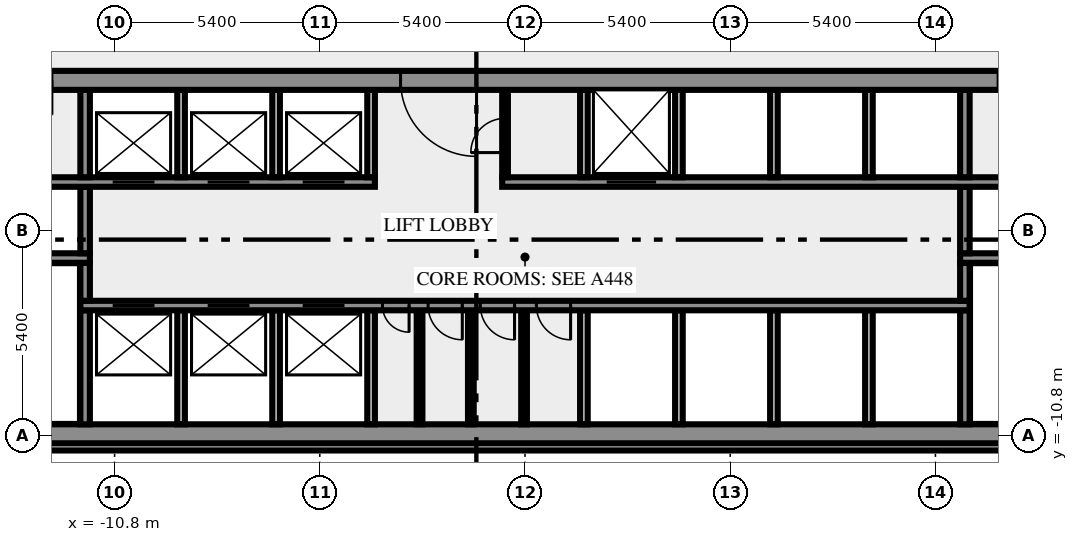
"""IFC4 building model, lengths in metres.
Left out: names, types, materials, properties, quantities, classifications, styles, units other than length and angle.
Written with IfcOpenShell. Run it as: python <this file> out.ifc"""

import sys

from ifc_helpers import new_model, si_unit, direction, frame, frame_2d, origin, place, context, subcontext, project, spatial, rectangle, extrude, element, fill, save


model = new_model("IFC4")
c1 = context("Model", 3, precision=1e-05, world=origin(), true_north=direction((0.0, 1.0)))
c2 = subcontext(c1, "Body", "Model", "MODEL_VIEW")
j1 = project(units=[si_unit("LENGTHUNIT", "METRE"), si_unit("PLANEANGLEUNIT", "RADIAN")], contexts=[c1])
p1 = place(None, origin())
s1 = spatial("IfcSite", under=j1, at=p1, CompositionType="ELEMENT")
p2 = place(p1, origin())
s2 = spatial("IfcBuilding", under=s1, at=p2, CompositionType="ELEMENT")
p3 = place(p2, frame((0.0, 0.0, 16.0)))
s3 = spatial("IfcBuildingStorey", under=s2, at=p3, CompositionType="ELEMENT", Elevation=16.0)
p4 = place(p3, frame((-17.444, -11.088, 0.0), z_axis=(0.0, 0.0, 1.0), x_axis=(1.0, 0.0, 0.0)))
e1 = element("IfcWall", 1, at=p4, inside=s3, PredefinedType="SOLIDWALL", context=c2, shape_type="SweptSolid", body=[
    extrude(rectangle(XDim=34.888, YDim=0.2, at=frame_2d((17.444, 0.0))), origin(), (0.0, 0.0, 1.0), 4.1),
])
p5 = place(p3, frame((-20.0, -10.75, 0.0), z_axis=(0.0, 0.0, 1.0), x_axis=(1.0, 0.0, 0.0)))
e2 = element("IfcWall", 2, at=p5, inside=s3, PredefinedType="SHEAR", context=c2, shape_type="SweptSolid", body=[
    extrude(rectangle(XDim=40.0, YDim=0.5, at=frame_2d((20.0, 0.0))), origin(), (0.0, 0.0, 1.0), 4.1),
])
p6 = place(p5, frame((0.8, 0.0, 1.0)))
e3 = element("IfcOpeningElement", 3, at=p6, cuts=e2, PredefinedType="OPENING", context=c2, shape_type="SweptSolid", body=[
    extrude(rectangle(XDim=1.2, YDim=1.2, at=frame_2d((0.6, 0.6))), frame((0.0, 0.26, 0.0), z_axis=(0.0, -1.0, 0.0), x_axis=(1.0, 0.0, 0.0)), (0.0, 0.0, 1.0), 0.52),
])
p7 = place(p5, frame((38.0, 0.0, 1.0)))
e4 = element("IfcOpeningElement", 4, at=p7, cuts=e2, PredefinedType="OPENING", context=c2, shape_type="SweptSolid", body=[
    extrude(rectangle(XDim=1.2, YDim=1.2, at=frame_2d((0.6, 0.6))), frame((0.0, 0.26, 0.0), z_axis=(0.0, -1.0, 0.0), x_axis=(1.0, 0.0, 0.0)), (0.0, 0.0, 1.0), 0.52),
])
p8 = place(p3, frame((-11.575, -10.5, 0.0), z_axis=(0.0, 0.0, 1.0), x_axis=(0.0, 1.0, 0.0)))
e5 = element("IfcWall", 5, at=p8, inside=s3, PredefinedType="SHEAR", context=c2, shape_type="SweptSolid", body=[
    extrude(rectangle(XDim=3.0, YDim=0.25, at=frame_2d((1.5, 0.0))), origin(), (0.0, 0.0, 1.0), 4.1),
])
for number, where, z_axis, x_axis in (
    (6, (-9.05, -10.5, 0.0), (0.0, 0.0, 1.0), (0.0, 1.0, 0.0)),
    (7, (-6.55, -10.5, 0.0), (0.0, 0.0, 1.0), (0.0, 1.0, 0.0)),
    (8, (-4.05, -10.5, 0.0), (0.0, 0.0, 1.0), (0.0, 1.0, 0.0)),
):
    element("IfcWall", number, at=place(p3, frame(where, z_axis=z_axis, x_axis=x_axis)), inside=s3, PredefinedType="SOLIDWALL", context=c2, shape_type="SweptSolid", body=[
        extrude(rectangle(XDim=3.0, YDim=0.2, at=frame_2d((1.5, 0.0))), origin(), (0.0, 0.0, 1.0), 4.1),
    ])
for number, where, z_axis, x_axis in (
    (9, (-2.775, -10.5, 0.0), (0.0, 0.0, 1.0), (0.0, 1.0, 0.0)),
    (10, (-1.425, -10.5, 0.0), (0.0, 0.0, 1.0), (0.0, 1.0, 0.0)),
    (11, (-0.025, -10.5, 0.0), (0.0, 0.0, 1.0), (0.0, 1.0, 0.0)),
):
    element("IfcWall", number, at=place(p3, frame(where, z_axis=z_axis, x_axis=x_axis)), inside=s3, PredefinedType="PARTITIONING", context=c2, shape_type="SweptSolid", body=[
        extrude(rectangle(XDim=3.0, YDim=0.15, at=frame_2d((1.5, 0.0))), origin(), (0.0, 0.0, 1.0), 4.1),
    ])
for number, where, z_axis, x_axis in (
    (12, (1.55, -10.5, 0.0), (0.0, 0.0, 1.0), (0.0, 1.0, 0.0)),
    (13, (4.05, -10.5, 0.0), (0.0, 0.0, 1.0), (0.0, 1.0, 0.0)),
    (14, (6.55, -10.5, 0.0), (0.0, 0.0, 1.0), (0.0, 1.0, 0.0)),
    (15, (9.05, -10.5, 0.0), (0.0, 0.0, 1.0), (0.0, 1.0, 0.0)),
):
    element("IfcWall", number, at=place(p3, frame(where, z_axis=z_axis, x_axis=x_axis)), inside=s3, PredefinedType="SOLIDWALL", context=c2, shape_type="SweptSolid", body=[
        extrude(rectangle(XDim=3.0, YDim=0.2, at=frame_2d((1.5, 0.0))), origin(), (0.0, 0.0, 1.0), 4.1),
    ])
p9 = place(p3, frame((11.575, -10.5, 0.0), z_axis=(0.0, 0.0, 1.0), x_axis=(0.0, 1.0, 0.0)))
e16 = element("IfcWall", 16, at=p9, inside=s3, PredefinedType="SHEAR", context=c2, shape_type="SweptSolid", body=[
    extrude(rectangle(XDim=3.0, YDim=0.25, at=frame_2d((1.5, 0.0))), origin(), (0.0, 0.0, 1.0), 4.1),
])
p10 = place(p3, frame((11.7, -7.375, 0.0), z_axis=(0.0, 0.0, 1.0), x_axis=(-1.0, 0.0, 0.0)))
e17 = element("IfcWall", 17, at=p10, inside=s3, PredefinedType="SHEAR", context=c2, shape_type="SweptSolid", body=[
    extrude(rectangle(XDim=23.4, YDim=0.25, at=frame_2d((11.7, 0.0))), origin(), (0.0, 0.0, 1.0), 4.1),
])
p11 = place(p10, frame((21.45, 0.0, 0.0)))
e18 = element("IfcOpeningElement", 18, at=p11, cuts=e17, PredefinedType="OPENING", context=c2, shape_type="SweptSolid", body=[
    extrude(rectangle(XDim=1.1, YDim=2.1, at=frame_2d((0.55, 1.05))), frame((0.0, 0.135, 0.0), z_axis=(0.0, -1.0, 0.0), x_axis=(1.0, 0.0, 0.0)), (0.0, 0.0, 1.0), 0.27),
])
p12 = place(p10, frame((18.95, 0.0, 0.0)))
e19 = element("IfcOpeningElement", 19, at=p12, cuts=e17, PredefinedType="OPENING", context=c2, shape_type="SweptSolid", body=[
    extrude(rectangle(XDim=1.1, YDim=2.1, at=frame_2d((0.55, 1.05))), frame((0.0, 0.135, 0.0), z_axis=(0.0, -1.0, 0.0), x_axis=(1.0, 0.0, 0.0)), (0.0, 0.0, 1.0), 0.27),
])
p13 = place(p10, frame((16.45, 0.0, 0.0)))
e20 = element("IfcOpeningElement", 20, at=p13, cuts=e17, PredefinedType="OPENING", context=c2, shape_type="SweptSolid", body=[
    extrude(rectangle(XDim=1.1, YDim=2.1, at=frame_2d((0.55, 1.05))), frame((0.0, 0.135, 0.0), z_axis=(0.0, -1.0, 0.0), x_axis=(1.0, 0.0, 0.0)), (0.0, 0.0, 1.0), 0.27),
])
p14 = place(p10, frame((14.75, 0.0, 0.0)))
e21 = element("IfcOpeningElement", 21, at=p14, cuts=e17, PredefinedType="OPENING", context=c2, shape_type="SweptSolid", body=[
    extrude(rectangle(XDim=0.7, YDim=2.1, at=frame_2d((0.35, 1.05))), frame((0.0, 0.135, 0.0), z_axis=(0.0, -1.0, 0.0), x_axis=(1.0, 0.0, 0.0)), (0.0, 0.0, 1.0), 0.27),
])
p15 = place(p10, frame((13.35, 0.0, 0.0)))
e22 = element("IfcOpeningElement", 22, at=p15, cuts=e17, PredefinedType="OPENING", context=c2, shape_type="SweptSolid", body=[
    extrude(rectangle(XDim=0.9, YDim=2.1, at=frame_2d((0.45, 1.05))), frame((0.0, 0.135, 0.0), z_axis=(0.0, -1.0, 0.0), x_axis=(1.0, 0.0, 0.0)), (0.0, 0.0, 1.0), 0.27),
])
p16 = place(p10, frame((11.975, 0.0, 0.0)))
e23 = element("IfcOpeningElement", 23, at=p16, cuts=e17, PredefinedType="OPENING", context=c2, shape_type="SweptSolid", body=[
    extrude(rectangle(XDim=0.9, YDim=2.1, at=frame_2d((0.45, 1.05))), frame((0.0, 0.135, 0.0), z_axis=(0.0, -1.0, 0.0), x_axis=(1.0, 0.0, 0.0)), (0.0, 0.0, 1.0), 0.27),
])
p17 = place(p10, frame((10.5, 0.0, 0.0)))
e24 = element("IfcOpeningElement", 24, at=p17, cuts=e17, PredefinedType="OPENING", context=c2, shape_type="SweptSolid", body=[
    extrude(rectangle(XDim=0.9, YDim=2.1, at=frame_2d((0.45, 1.05))), frame((0.0, 0.135, 0.0), z_axis=(0.0, -1.0, 0.0), x_axis=(1.0, 0.0, 0.0)), (0.0, 0.0, 1.0), 0.27),
])
for number, where, z_axis, x_axis in (
    (25, (-11.575, -7.25, 0.0), (0.0, 0.0, 1.0), (0.0, 1.0, 0.0)),
    (26, (11.575, -7.25, 0.0), (0.0, 0.0, 1.0), (0.0, 1.0, 0.0)),
):
    element("IfcWall", number, at=place(p3, frame(where, z_axis=z_axis, x_axis=x_axis)), inside=s3, PredefinedType="SHEAR", context=c2, shape_type="SweptSolid", body=[
        extrude(rectangle(XDim=1.0, YDim=0.25, at=frame_2d((0.5, 0.0))), origin(), (0.0, 0.0, 1.0), 4.1),
    ])
p18 = place(p3, frame((-11.45, -6.125, 0.0), z_axis=(0.0, 0.0, 1.0), x_axis=(-1.0, 0.0, 0.0)))
e27 = element("IfcWall", 27, at=p18, inside=s3, PredefinedType="SHEAR", context=c2, shape_type="SweptSolid", body=[
    extrude(rectangle(XDim=8.05, YDim=0.25, at=frame_2d((4.025, 0.0))), origin(), (0.0, 0.0, 1.0), 4.1),
])
p19 = place(p18, frame((6.2, 0.0, 0.0)))
e28 = element("IfcOpeningElement", 28, at=p19, cuts=e27, PredefinedType="OPENING", context=c2, shape_type="SweptSolid", body=[
    extrude(rectangle(XDim=1.8, YDim=2.1, at=frame_2d((0.9, 1.05))), frame((0.0, 0.135, 0.0), z_axis=(0.0, -1.0, 0.0), x_axis=(1.0, 0.0, 0.0)), (0.0, 0.0, 1.0), 0.27),
])
p20 = place(p3, frame((19.5, -6.125, 0.0), z_axis=(0.0, 0.0, 1.0), x_axis=(-1.0, 0.0, 0.0)))
e29 = element("IfcWall", 29, at=p20, inside=s3, PredefinedType="SHEAR", context=c2, shape_type="SweptSolid", body=[
    extrude(rectangle(XDim=8.05, YDim=0.25, at=frame_2d((4.025, 0.0))), origin(), (0.0, 0.0, 1.0), 4.1),
])
p21 = place(p20, frame((0.05, 0.0, 0.0)))
e30 = element("IfcOpeningElement", 30, at=p21, cuts=e29, PredefinedType="OPENING", context=c2, shape_type="SweptSolid", body=[
    extrude(rectangle(XDim=1.8, YDim=2.1, at=frame_2d((0.9, 1.05))), frame((0.0, 0.135, 0.0), z_axis=(0.0, -1.0, 0.0), x_axis=(1.0, 0.0, 0.0)), (0.0, 0.0, 1.0), 0.27),
])
for number, where, z_axis, x_axis in (
    (31, (-11.575, -6.0, 0.0), (0.0, 0.0, 1.0), (0.0, 1.0, 0.0)),
    (32, (11.575, -6.0, 0.0), (0.0, 0.0, 1.0), (0.0, 1.0, 0.0)),
):
    element("IfcWall", number, at=place(p3, frame(where, z_axis=z_axis, x_axis=x_axis)), inside=s3, PredefinedType="SHEAR", context=c2, shape_type="SweptSolid", body=[
        extrude(rectangle(XDim=1.75, YDim=0.25, at=frame_2d((0.875, 0.0))), origin(), (0.0, 0.0, 1.0), 4.1),
    ])
p22 = place(p3, frame((-14.35, -4.125, 0.0), z_axis=(0.0, 0.0, 1.0), x_axis=(1.0, 0.0, 0.0)))
e33 = element("IfcWall", 33, at=p22, inside=s3, PredefinedType="SHEAR", context=c2, shape_type="SweptSolid", body=[
    extrude(rectangle(XDim=10.4, YDim=0.25, at=frame_2d((5.2, 0.0))), origin(), (0.0, 0.0, 1.0), 4.1),
])
p23 = place(p22, frame((3.5, 0.0, 0.0)))
e34 = element("IfcOpeningElement", 34, at=p23, cuts=e33, PredefinedType="OPENING", context=c2, shape_type="SweptSolid", body=[
    extrude(rectangle(XDim=1.1, YDim=2.1, at=frame_2d((0.55, 1.05))), frame((0.0, 0.135, 0.0), z_axis=(0.0, -1.0, 0.0), x_axis=(1.0, 0.0, 0.0)), (0.0, 0.0, 1.0), 0.27),
])
p24 = place(p22, frame((6.0, 0.0, 0.0)))
e35 = element("IfcOpeningElement", 35, at=p24, cuts=e33, PredefinedType="OPENING", context=c2, shape_type="SweptSolid", body=[
    extrude(rectangle(XDim=1.1, YDim=2.1, at=frame_2d((0.55, 1.05))), frame((0.0, 0.135, 0.0), z_axis=(0.0, -1.0, 0.0), x_axis=(1.0, 0.0, 0.0)), (0.0, 0.0, 1.0), 0.27),
])
p25 = place(p22, frame((8.5, 0.0, 0.0)))
e36 = element("IfcOpeningElement", 36, at=p25, cuts=e33, PredefinedType="OPENING", context=c2, shape_type="SweptSolid", body=[
    extrude(rectangle(XDim=1.1, YDim=2.1, at=frame_2d((0.55, 1.05))), frame((0.0, 0.135, 0.0), z_axis=(0.0, -1.0, 0.0), x_axis=(1.0, 0.0, 0.0)), (0.0, 0.0, 1.0), 0.27),
])
p26 = place(p3, frame((-0.6, -4.125, 0.0), z_axis=(0.0, 0.0, 1.0), x_axis=(1.0, 0.0, 0.0)))
e37 = element("IfcWall", 37, at=p26, inside=s3, PredefinedType="SHEAR", context=c2, shape_type="SweptSolid", body=[
    extrude(rectangle(XDim=14.95, YDim=0.25, at=frame_2d((7.475, 0.0))), origin(), (0.0, 0.0, 1.0), 4.1),
])
p27 = place(p26, frame((2.75, 0.0, 0.0)))
e38 = element("IfcOpeningElement", 38, at=p27, cuts=e37, PredefinedType="OPENING", context=c2, shape_type="SweptSolid", body=[
    extrude(rectangle(XDim=1.3, YDim=2.1, at=frame_2d((0.65, 1.05))), frame((0.0, 0.135, 0.0), z_axis=(0.0, -1.0, 0.0), x_axis=(1.0, 0.0, 0.0)), (0.0, 0.0, 1.0), 0.27),
])
p28 = place(p3, frame((-11.575, -4.0, 0.0), z_axis=(0.0, 0.0, 1.0), x_axis=(0.0, 1.0, 0.0)))
e39 = element("IfcWall", 39, at=p28, inside=s3, PredefinedType="SHEAR", context=c2, shape_type="SweptSolid", body=[
    extrude(rectangle(XDim=2.3, YDim=0.25, at=frame_2d((1.15, 0.0))), origin(), (0.0, 0.0, 1.0), 4.1),
])
for number, where, z_axis, x_axis in (
    (40, (-9.05, -4.0, 0.0), (0.0, 0.0, 1.0), (0.0, 1.0, 0.0)),
    (41, (-6.55, -4.0, 0.0), (0.0, 0.0, 1.0), (0.0, 1.0, 0.0)),
    (42, (-4.05, -4.0, 0.0), (0.0, 0.0, 1.0), (0.0, 1.0, 0.0)),
):
    element("IfcWall", number, at=place(p3, frame(where, z_axis=z_axis, x_axis=x_axis)), inside=s3, PredefinedType="SOLIDWALL", context=c2, shape_type="SweptSolid", body=[
        extrude(rectangle(XDim=2.3, YDim=0.2, at=frame_2d((1.15, 0.0))), origin(), (0.0, 0.0, 1.0), 4.1),
    ])
p29 = place(p3, frame((-0.525, -4.0, 0.0), z_axis=(0.0, 0.0, 1.0), x_axis=(0.0, 1.0, 0.0)))
e43 = element("IfcWall", 43, at=p29, inside=s3, PredefinedType="PARTITIONING", context=c2, shape_type="SweptSolid", body=[
    extrude(rectangle(XDim=2.3, YDim=0.15, at=frame_2d((1.15, 0.0))), origin(), (0.0, 0.0, 1.0), 4.1),
])
p30 = place(p29, frame((0.65, 0.0, 0.0)))
e44 = element("IfcOpeningElement", 44, at=p30, cuts=e43, PredefinedType="OPENING", context=c2, shape_type="SweptSolid", body=[
    extrude(rectangle(XDim=0.9, YDim=2.1, at=frame_2d((0.45, 1.05))), frame((0.0, 0.085, 0.0), z_axis=(0.0, -1.0, 0.0), x_axis=(1.0, 0.0, 0.0)), (0.0, 0.0, 1.0), 0.17),
])
for number, where, z_axis, x_axis in (
    (45, (1.55, -4.0, 0.0), (0.0, 0.0, 1.0), (0.0, 1.0, 0.0)),
    (46, (4.05, -4.0, 0.0), (0.0, 0.0, 1.0), (0.0, 1.0, 0.0)),
    (47, (6.55, -4.0, 0.0), (0.0, 0.0, 1.0), (0.0, 1.0, 0.0)),
    (48, (9.05, -4.0, 0.0), (0.0, 0.0, 1.0), (0.0, 1.0, 0.0)),
):
    element("IfcWall", number, at=place(p3, frame(where, z_axis=z_axis, x_axis=x_axis)), inside=s3, PredefinedType="SOLIDWALL", context=c2, shape_type="SweptSolid", body=[
        extrude(rectangle(XDim=2.3, YDim=0.2, at=frame_2d((1.15, 0.0))), origin(), (0.0, 0.0, 1.0), 4.1),
    ])
p31 = place(p3, frame((11.575, -4.0, 0.0), z_axis=(0.0, 0.0, 1.0), x_axis=(0.0, 1.0, 0.0)))
e49 = element("IfcWall", 49, at=p31, inside=s3, PredefinedType="SHEAR", context=c2, shape_type="SweptSolid", body=[
    extrude(rectangle(XDim=2.3, YDim=0.25, at=frame_2d((1.15, 0.0))), origin(), (0.0, 0.0, 1.0), 4.1),
])
p32 = place(p3, frame((20.49, -1.45, 0.0), z_axis=(0.0, 0.0, 1.0), x_axis=(-1.0, 0.0, 0.0)))
e50 = element("IfcWall", 50, at=p32, inside=s3, PredefinedType="SHEAR", context=c2, shape_type="SweptSolid", body=[
    extrude(rectangle(XDim=40.98, YDim=0.5, at=frame_2d((20.49, 0.0))), origin(), (0.0, 0.0, 1.0), 4.1),
])
p33 = place(p32, frame((38.14, 0.0, 0.0)))
e51 = element("IfcOpeningElement", 51, at=p33, cuts=e50, PredefinedType="OPENING", context=c2, shape_type="SweptSolid", body=[
    extrude(rectangle(XDim=1.8, YDim=2.1, at=frame_2d((0.9, 1.05))), frame((0.0, 0.26, 0.0), z_axis=(0.0, -1.0, 0.0), x_axis=(1.0, 0.0, 0.0)), (0.0, 0.0, 1.0), 0.52),
])
p34 = place(p32, frame((36.728, 0.0, 0.0)))
e52 = element("IfcOpeningElement", 52, at=p34, cuts=e50, PredefinedType="OPENING", context=c2, shape_type="SweptSolid", body=[
    extrude(rectangle(XDim=0.8, YDim=2.1, at=frame_2d((0.4, 1.05))), frame((0.0, 0.26, 0.0), z_axis=(0.0, -1.0, 0.0), x_axis=(1.0, 0.0, 0.0)), (0.0, 0.0, 1.0), 0.52),
])
p35 = place(p32, frame((35.153, 0.0, 0.0)))
e53 = element("IfcOpeningElement", 53, at=p35, cuts=e50, PredefinedType="OPENING", context=c2, shape_type="SweptSolid", body=[
    extrude(rectangle(XDim=0.8, YDim=2.1, at=frame_2d((0.4, 1.05))), frame((0.0, 0.26, 0.0), z_axis=(0.0, -1.0, 0.0), x_axis=(1.0, 0.0, 0.0)), (0.0, 0.0, 1.0), 0.52),
])
p36 = place(p32, frame((32.94, 0.0, 0.0)))
e54 = element("IfcOpeningElement", 54, at=p36, cuts=e50, PredefinedType="OPENING", context=c2, shape_type="SweptSolid", body=[
    extrude(rectangle(XDim=0.9, YDim=2.1, at=frame_2d((0.45, 1.05))), frame((0.0, 0.26, 0.0), z_axis=(0.0, -1.0, 0.0), x_axis=(1.0, 0.0, 0.0)), (0.0, 0.0, 1.0), 0.52),
])
p37 = place(p32, frame((21.765, 0.0, 0.0)))
e55 = element("IfcOpeningElement", 55, at=p37, cuts=e50, PredefinedType="OPENING", context=c2, shape_type="SweptSolid", body=[
    extrude(rectangle(XDim=2.0, YDim=2.1, at=frame_2d((1.0, 1.05))), frame((0.0, 0.26, 0.0), z_axis=(0.0, -1.0, 0.0), x_axis=(1.0, 0.0, 0.0)), (0.0, 0.0, 1.0), 0.52),
])
p38 = place(p32, frame((7.14, 0.0, 0.0)))
e56 = element("IfcOpeningElement", 56, at=p38, cuts=e50, PredefinedType="OPENING", context=c2, shape_type="SweptSolid", body=[
    extrude(rectangle(XDim=0.9, YDim=2.1, at=frame_2d((0.45, 1.05))), frame((0.0, 0.26, 0.0), z_axis=(0.0, -1.0, 0.0), x_axis=(1.0, 0.0, 0.0)), (0.0, 0.0, 1.0), 0.52),
])
p39 = place(p32, frame((4.19, 0.0, 0.0)))
e57 = element("IfcOpeningElement", 57, at=p39, cuts=e50, PredefinedType="OPENING", context=c2, shape_type="SweptSolid", body=[
    extrude(rectangle(XDim=0.9, YDim=2.1, at=frame_2d((0.45, 1.05))), frame((0.0, 0.26, 0.0), z_axis=(0.0, -1.0, 0.0), x_axis=(1.0, 0.0, 0.0)), (0.0, 0.0, 1.0), 0.52),
])
p40 = place(p32, frame((1.04, 0.0, 0.0)))
e58 = element("IfcOpeningElement", 58, at=p40, cuts=e50, PredefinedType="OPENING", context=c2, shape_type="SweptSolid", body=[
    extrude(rectangle(XDim=1.8, YDim=2.1, at=frame_2d((0.9, 1.05))), frame((0.0, 0.26, 0.0), z_axis=(0.0, -1.0, 0.0), x_axis=(1.0, 0.0, 0.0)), (0.0, 0.0, 1.0), 0.52),
])
p41 = place(p11, origin())
e59 = element("IfcDoor", 59, at=p41, inside=s3, OperationType="DOUBLE_DOOR_SLIDING", PredefinedType="DOOR", context=c2, shape_type="SweptSolid", body=[
    extrude(rectangle(XDim=1.1, YDim=2.1, at=frame_2d((0.55, 1.05))), frame((0.0, 0.025, 0.0), z_axis=(0.0, -1.0, 0.0), x_axis=(1.0, 0.0, 0.0)), (0.0, 0.0, 1.0), 0.05),
])
fill(e18, e59)
p42 = place(p12, origin())
e60 = element("IfcDoor", 60, at=p42, inside=s3, OperationType="DOUBLE_DOOR_SLIDING", PredefinedType="DOOR", context=c2, shape_type="SweptSolid", body=[
    extrude(rectangle(XDim=1.1, YDim=2.1, at=frame_2d((0.55, 1.05))), frame((0.0, 0.025, 0.0), z_axis=(0.0, -1.0, 0.0), x_axis=(1.0, 0.0, 0.0)), (0.0, 0.0, 1.0), 0.05),
])
fill(e19, e60)
p43 = place(p13, origin())
e61 = element("IfcDoor", 61, at=p43, inside=s3, OperationType="DOUBLE_DOOR_SLIDING", PredefinedType="DOOR", context=c2, shape_type="SweptSolid", body=[
    extrude(rectangle(XDim=1.1, YDim=2.1, at=frame_2d((0.55, 1.05))), frame((0.0, 0.025, 0.0), z_axis=(0.0, -1.0, 0.0), x_axis=(1.0, 0.0, 0.0)), (0.0, 0.0, 1.0), 0.05),
])
fill(e20, e61)
p44 = place(p14, origin())
e62 = element("IfcDoor", 62, at=p44, inside=s3, OperationType="SINGLE_SWING_RIGHT", PredefinedType="DOOR", context=c2, shape_type="SweptSolid", body=[
    extrude(rectangle(XDim=0.7, YDim=2.1, at=frame_2d((0.35, 1.05))), frame((0.0, 0.025, 0.0), z_axis=(0.0, -1.0, 0.0), x_axis=(1.0, 0.0, 0.0)), (0.0, 0.0, 1.0), 0.05),
])
fill(e21, e62)
p45 = place(p15, origin())
e63 = element("IfcDoor", 63, at=p45, inside=s3, OperationType="SINGLE_SWING_RIGHT", PredefinedType="DOOR", context=c2, shape_type="SweptSolid", body=[
    extrude(rectangle(XDim=0.9, YDim=2.1, at=frame_2d((0.45, 1.05))), frame((0.0, 0.025, 0.0), z_axis=(0.0, -1.0, 0.0), x_axis=(1.0, 0.0, 0.0)), (0.0, 0.0, 1.0), 0.05),
])
fill(e22, e63)
p46 = place(p16, origin())
e64 = element("IfcDoor", 64, at=p46, inside=s3, OperationType="SINGLE_SWING_RIGHT", PredefinedType="DOOR", context=c2, shape_type="SweptSolid", body=[
    extrude(rectangle(XDim=0.9, YDim=2.1, at=frame_2d((0.45, 1.05))), frame((0.0, 0.025, 0.0), z_axis=(0.0, -1.0, 0.0), x_axis=(1.0, 0.0, 0.0)), (0.0, 0.0, 1.0), 0.05),
])
fill(e23, e64)
p47 = place(p17, origin())
e65 = element("IfcDoor", 65, at=p47, inside=s3, OperationType="SINGLE_SWING_LEFT", PredefinedType="DOOR", context=c2, shape_type="SweptSolid", body=[
    extrude(rectangle(XDim=0.9, YDim=2.1, at=frame_2d((0.45, 1.05))), frame((0.0, 0.025, 0.0), z_axis=(0.0, -1.0, 0.0), x_axis=(1.0, 0.0, 0.0)), (0.0, 0.0, 1.0), 0.05),
])
fill(e24, e65)
p48 = place(p23, origin())
e66 = element("IfcDoor", 66, at=p48, inside=s3, OperationType="DOUBLE_DOOR_SLIDING", PredefinedType="DOOR", context=c2, shape_type="SweptSolid", body=[
    extrude(rectangle(XDim=1.1, YDim=2.1, at=frame_2d((0.55, 1.05))), frame((0.0, 0.025, 0.0), z_axis=(0.0, -1.0, 0.0), x_axis=(1.0, 0.0, 0.0)), (0.0, 0.0, 1.0), 0.05),
])
fill(e34, e66)
p49 = place(p24, origin())
e67 = element("IfcDoor", 67, at=p49, inside=s3, OperationType="DOUBLE_DOOR_SLIDING", PredefinedType="DOOR", context=c2, shape_type="SweptSolid", body=[
    extrude(rectangle(XDim=1.1, YDim=2.1, at=frame_2d((0.55, 1.05))), frame((0.0, 0.025, 0.0), z_axis=(0.0, -1.0, 0.0), x_axis=(1.0, 0.0, 0.0)), (0.0, 0.0, 1.0), 0.05),
])
fill(e35, e67)
p50 = place(p25, origin())
e68 = element("IfcDoor", 68, at=p50, inside=s3, OperationType="DOUBLE_DOOR_SLIDING", PredefinedType="DOOR", context=c2, shape_type="SweptSolid", body=[
    extrude(rectangle(XDim=1.1, YDim=2.1, at=frame_2d((0.55, 1.05))), frame((0.0, 0.025, 0.0), z_axis=(0.0, -1.0, 0.0), x_axis=(1.0, 0.0, 0.0)), (0.0, 0.0, 1.0), 0.05),
])
fill(e36, e68)
p51 = place(p27, origin())
e69 = element("IfcDoor", 69, at=p51, inside=s3, OperationType="DOUBLE_DOOR_SLIDING", PredefinedType="DOOR", context=c2, shape_type="SweptSolid", body=[
    extrude(rectangle(XDim=1.3, YDim=2.1, at=frame_2d((0.65, 1.05))), frame((0.0, 0.025, 0.0), z_axis=(0.0, -1.0, 0.0), x_axis=(1.0, 0.0, 0.0)), (0.0, 0.0, 1.0), 0.05),
])
fill(e38, e69)
p52 = place(p30, origin())
e70 = element("IfcDoor", 70, at=p52, inside=s3, OperationType="SINGLE_SWING_LEFT", PredefinedType="DOOR", context=c2, shape_type="SweptSolid", body=[
    extrude(rectangle(XDim=0.9, YDim=2.1, at=frame_2d((0.45, 1.05))), frame((0.0, 0.025, 0.0), z_axis=(0.0, -1.0, 0.0), x_axis=(1.0, 0.0, 0.0)), (0.0, 0.0, 1.0), 0.05),
])
fill(e44, e70)
p53 = place(p37, origin())
e71 = element("IfcDoor", 71, at=p53, inside=s3, OperationType="DOUBLE_DOOR_SINGLE_SWING", PredefinedType="DOOR", context=c2, shape_type="SweptSolid", body=[
    extrude(rectangle(XDim=2.0, YDim=2.1, at=frame_2d((1.0, 1.05))), frame((0.0, 0.025, 0.0), z_axis=(0.0, -1.0, 0.0), x_axis=(1.0, 0.0, 0.0)), (0.0, 0.0, 1.0), 0.05),
])
fill(e55, e71)
save(model, sys.argv[1])
